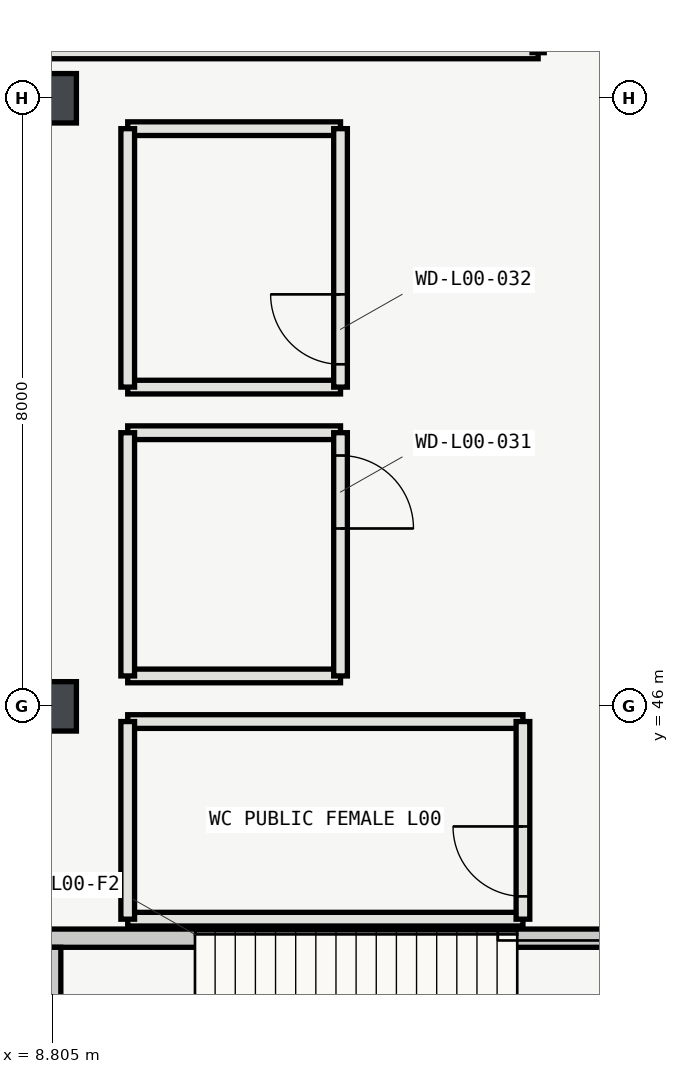
"""IFC4 building model, lengths in metres.
Left out: names, types, materials, properties, quantities, classifications, styles, units other than length and angle.
Written with IfcOpenShell. Run it as: python <this file> out.ifc"""

import sys

from ifc_helpers import new_model, si_unit, direction, frame, frame_2d, origin, origin_2d, place, context, subcontext, project, spatial, rectangle, hollow_rectangle, extrude, element, fill, save


model = new_model("IFC4")
c1 = context("Model", 3, precision=1e-05, world=origin(), true_north=direction((0.0, 1.0)))
c2 = subcontext(c1, "Body", "Model", "MODEL_VIEW")
j1 = project(units=[si_unit("LENGTHUNIT", "METRE"), si_unit("PLANEANGLEUNIT", "RADIAN")], contexts=[c1])
p1 = place(None, origin())
s1 = spatial("IfcSite", under=j1, at=p1, CompositionType="ELEMENT")
p2 = place(p1, origin())
s2 = spatial("IfcBuilding", under=s1, at=p2, CompositionType="ELEMENT")
p3 = place(p2, origin())
s3 = spatial("IfcBuildingStorey", under=s2, at=p3, CompositionType="ELEMENT", Elevation=0.0)
for number, where, z_axis, x_axis in (
    (1, (8.8, 46.0, 0.0), (0.0, 0.0, 1.0), (1.0, 0.0, 0.0)),
    (2, (8.8, 54.0, 0.0), (0.0, 0.0, 1.0), (1.0, 0.0, 0.0)),
):
    element("IfcColumn", number, at=place(p3, frame(where, z_axis=z_axis, x_axis=x_axis)), inside=s3, PredefinedType="COLUMN", context=c2, shape_type="SweptSolid", body=[
        extrude(hollow_rectangle(XDim=0.65, YDim=0.65, WallThickness=0.026, InnerFilletRadius=0.026, OuterFilletRadius=0.052, at=origin_2d()), origin(), (0.0, 0.0, 1.0), 5.4),
    ])
for number, where, z_axis, x_axis in (
    (3, (9.8, 46.4, 0.0), (0.0, 0.0, 1.0), (1.0, 0.0, 0.0)),
    (4, (12.6, 49.6, 0.0), (0.0, 0.0, 1.0), (-1.0, 0.0, 0.0)),
):
    element("IfcWall", number, at=place(p3, frame(where, z_axis=z_axis, x_axis=x_axis)), inside=s3, PredefinedType="PLUMBINGWALL", context=c2, shape_type="SweptSolid", body=[
        extrude(rectangle(XDim=2.8, YDim=0.18, at=frame_2d((1.4, 0.0))), origin(), (0.0, 0.0, 1.0), 5.12),
    ])
p4 = place(p3, frame((9.8, 49.6, 0.0), z_axis=(0.0, 0.0, 1.0), x_axis=(0.0, -1.0, 0.0)))
e5 = element("IfcWall", 5, at=p4, inside=s3, PredefinedType="PLUMBINGWALL", context=c2, shape_type="SweptSolid", body=[
    extrude(rectangle(XDim=3.2, YDim=0.18, at=frame_2d((1.6, 0.0))), origin(), (0.0, 0.0, 1.0), 5.12),
])
p5 = place(p3, frame((12.6, 46.4, 0.0), z_axis=(0.0, 0.0, 1.0), x_axis=(0.0, 1.0, 0.0)))
e6 = element("IfcWall", 6, at=p5, inside=s3, PredefinedType="PLUMBINGWALL", context=c2, shape_type="SweptSolid", body=[
    extrude(rectangle(XDim=3.2, YDim=0.18, at=frame_2d((1.6, 0.0))), origin(), (0.0, 0.0, 1.0), 5.12),
])
p6 = place(p5, frame((1.94, 0.0, 0.0)))
e7 = element("IfcOpeningElement", 7, at=p6, cuts=e6, PredefinedType="OPENING", context=c2, shape_type="SweptSolid", body=[
    extrude(rectangle(XDim=0.96, YDim=2.1, at=frame_2d((0.48, 1.05))), frame((0.0, 0.1, 0.0), z_axis=(0.0, -1.0, 0.0), x_axis=(1.0, 0.0, 0.0)), (0.0, 0.0, 1.0), 0.2),
])
for number, where, z_axis, x_axis in (
    (8, (9.8, 50.2, 0.0), (0.0, 0.0, 1.0), (1.0, 0.0, 0.0)),
    (9, (12.6, 53.6, 0.0), (0.0, 0.0, 1.0), (-1.0, 0.0, 0.0)),
):
    element("IfcWall", number, at=place(p3, frame(where, z_axis=z_axis, x_axis=x_axis)), inside=s3, PredefinedType="PLUMBINGWALL", context=c2, shape_type="SweptSolid", body=[
        extrude(rectangle(XDim=2.8, YDim=0.18, at=frame_2d((1.4, 0.0))), origin(), (0.0, 0.0, 1.0), 5.12),
    ])
p7 = place(p3, frame((9.8, 53.6, 0.0), z_axis=(0.0, 0.0, 1.0), x_axis=(0.0, -1.0, 0.0)))
e10 = element("IfcWall", 10, at=p7, inside=s3, PredefinedType="PLUMBINGWALL", context=c2, shape_type="SweptSolid", body=[
    extrude(rectangle(XDim=3.4, YDim=0.18, at=frame_2d((1.7, 0.0))), origin(), (0.0, 0.0, 1.0), 5.12),
])
p8 = place(p3, frame((12.6, 50.2, 0.0), z_axis=(0.0, 0.0, 1.0), x_axis=(0.0, 1.0, 0.0)))
e11 = element("IfcWall", 11, at=p8, inside=s3, PredefinedType="PLUMBINGWALL", context=c2, shape_type="SweptSolid", body=[
    extrude(rectangle(XDim=3.4, YDim=0.18, at=frame_2d((1.7, 0.0))), origin(), (0.0, 0.0, 1.0), 5.12),
])
p9 = place(p8, frame((0.3, 0.0, 0.0)))
e12 = element("IfcOpeningElement", 12, at=p9, cuts=e11, PredefinedType="OPENING", context=c2, shape_type="SweptSolid", body=[
    extrude(rectangle(XDim=0.92, YDim=2.1, at=frame_2d((0.46, 1.05))), frame((0.0, 0.1, 0.0), z_axis=(0.0, -1.0, 0.0), x_axis=(1.0, 0.0, 0.0)), (0.0, 0.0, 1.0), 0.2),
])
p10 = place(p3, frame((9.8, 43.2, 0.0), z_axis=(0.0, 0.0, 1.0), x_axis=(1.0, 0.0, 0.0)))
e13 = element("IfcWall", 13, at=p10, inside=s3, PredefinedType="PLUMBINGWALL", context=c2, shape_type="SweptSolid", body=[
    extrude(rectangle(XDim=5.2, YDim=0.18, at=frame_2d((2.6, 0.0))), origin(), (0.0, 0.0, 1.0), 5.12),
])
p11 = place(p3, frame((15.0, 45.8, 0.0), z_axis=(0.0, 0.0, 1.0), x_axis=(-1.0, 0.0, 0.0)))
e14 = element("IfcWall", 14, at=p11, inside=s3, PredefinedType="PLUMBINGWALL", context=c2, shape_type="SweptSolid", body=[
    extrude(rectangle(XDim=5.2, YDim=0.18, at=frame_2d((2.6, 0.0))), origin(), (0.0, 0.0, 1.0), 4.638),
])
p12 = place(p3, frame((9.8, 45.8, 0.0), z_axis=(0.0, 0.0, 1.0), x_axis=(0.0, -1.0, 0.0)))
e15 = element("IfcWall", 15, at=p12, inside=s3, PredefinedType="PLUMBINGWALL", context=c2, shape_type="SweptSolid", body=[
    extrude(rectangle(XDim=2.6, YDim=0.18, at=frame_2d((1.3, 0.0))), origin(), (0.0, 0.0, 1.0), 5.12),
])
p13 = place(p3, frame((15.0, 43.2, 0.0), z_axis=(0.0, 0.0, 1.0), x_axis=(0.0, 1.0, 0.0)))
e16 = element("IfcWall", 16, at=p13, inside=s3, PredefinedType="PLUMBINGWALL", context=c2, shape_type="SweptSolid", body=[
    extrude(rectangle(XDim=2.6, YDim=0.18, at=frame_2d((1.3, 0.0))), origin(), (0.0, 0.0, 1.0), 5.12),
])
p14 = place(p13, frame((0.3, 0.0, 0.0)))
e17 = element("IfcOpeningElement", 17, at=p14, cuts=e16, PredefinedType="OPENING", context=c2, shape_type="SweptSolid", body=[
    extrude(rectangle(XDim=0.92, YDim=2.1, at=frame_2d((0.46, 1.05))), frame((0.0, 0.1, 0.0), z_axis=(0.0, -1.0, 0.0), x_axis=(1.0, 0.0, 0.0)), (0.0, 0.0, 1.0), 0.2),
])
p15 = place(p3, frame((0.8, 54.6, 0.0), z_axis=(0.0, 0.0, 1.0), x_axis=(1.0, 0.0, 0.0)))
e18 = element("IfcWall", 18, at=p15, inside=s3, PredefinedType="PARTITIONING", context=c2, shape_type="SweptSolid", body=[
    extrude(rectangle(XDim=14.4, YDim=0.16, at=frame_2d((7.2, 0.0))), origin(), (0.0, 0.0, 1.0), 5.12),
])
p16 = place(p3, frame((17.72, 42.95, 0.0), z_axis=(0.0, 0.0, 1.0), x_axis=(-1.0, 0.0, 0.0)))
e19 = element("IfcWall", 19, at=p16, inside=s3, PredefinedType="SHEAR", context=c2, shape_type="SweptSolid", body=[
    extrude(rectangle(XDim=9.04, YDim=0.24, at=frame_2d((4.52, 0.0))), origin(), (0.0, 0.0, 1.0), 5.12),
])
p17 = place(p3, frame((8.8, 38.67, 0.0), z_axis=(0.0, 0.0, 1.0), x_axis=(0.0, 1.0, 0.0)))
e20 = element("IfcWall", 20, at=p17, inside=s3, PredefinedType="SHEAR", context=c2, shape_type="SweptSolid", body=[
    extrude(rectangle(XDim=4.16, YDim=0.24, at=frame_2d((2.08, 0.0))), origin(), (0.0, 0.0, 1.0), 5.12),
])
p18 = place(p17, frame((1.38, 0.0, 0.0)))
e21 = element("IfcOpeningElement", 21, at=p18, cuts=e20, PredefinedType="OPENING", context=c2, shape_type="SweptSolid", body=[
    extrude(rectangle(XDim=1.4, YDim=2.2, at=frame_2d((0.7, 1.1))), frame((0.0, 0.13, 0.0), z_axis=(0.0, -1.0, 0.0), x_axis=(1.0, 0.0, 0.0)), (0.0, 0.0, 1.0), 0.26),
])
p19 = place(p6, origin())
e22 = element("IfcDoor", 22, at=p19, inside=s3, OperationType="SINGLE_SWING_LEFT", PredefinedType="DOOR", context=c2, shape_type="SweptSolid", body=[
    extrude(rectangle(XDim=0.96, YDim=2.1, at=frame_2d((0.48, 1.05))), frame((0.0, 0.025, 0.0), z_axis=(0.0, -1.0, 0.0), x_axis=(1.0, 0.0, 0.0)), (0.0, 0.0, 1.0), 0.05),
])
fill(e7, e22)
p20 = place(p9, origin())
e23 = element("IfcDoor", 23, at=p20, inside=s3, OperationType="SINGLE_SWING_RIGHT", PredefinedType="DOOR", context=c2, shape_type="SweptSolid", body=[
    extrude(rectangle(XDim=0.92, YDim=2.1, at=frame_2d((0.46, 1.05))), frame((0.0, 0.025, 0.0), z_axis=(0.0, -1.0, 0.0), x_axis=(1.0, 0.0, 0.0)), (0.0, 0.0, 1.0), 0.05),
])
fill(e12, e23)
p21 = place(p14, origin())
e24 = element("IfcDoor", 24, at=p21, inside=s3, OperationType="SINGLE_SWING_RIGHT", PredefinedType="DOOR", context=c2, shape_type="SweptSolid", body=[
    extrude(rectangle(XDim=0.92, YDim=2.1, at=frame_2d((0.46, 1.05))), frame((0.0, 0.025, 0.0), z_axis=(0.0, -1.0, 0.0), x_axis=(1.0, 0.0, 0.0)), (0.0, 0.0, 1.0), 0.05),
])
fill(e17, e24)
save(model, sys.argv[1])
